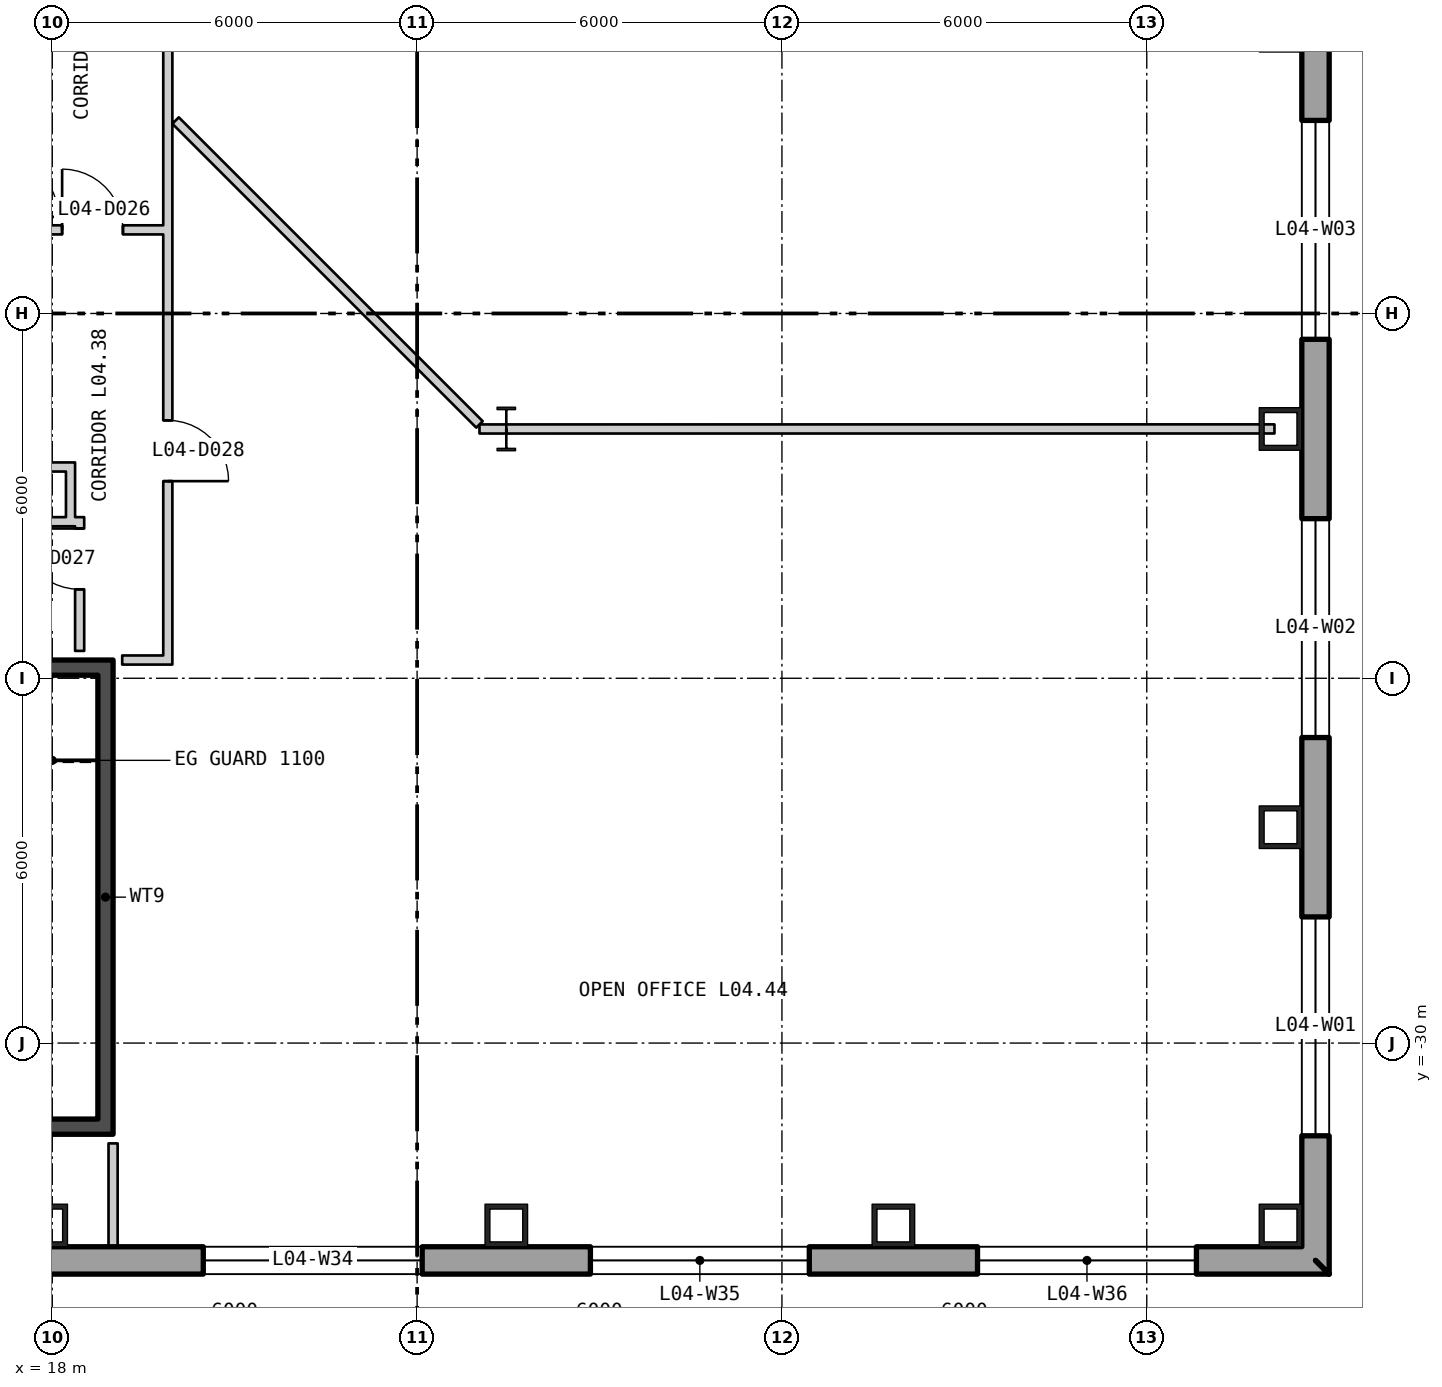
"""IFC4 building model, lengths in metres.
Left out: names, types, materials, properties, quantities, classifications, styles, units other than length and angle.
Written with IfcOpenShell. Run it as: python <this file> out.ifc"""

import sys

from ifc_helpers import new_model, si_unit, direction, frame, frame_2d, origin, origin_2d, place, context, subcontext, project, spatial, polyline, rectangle, hollow_rectangle, i_section, outline, extrude, element, fill, save


model = new_model("IFC4")
c1 = context("Model", 3, precision=1e-05, world=origin(), true_north=direction((0.0, 1.0)))
c2 = subcontext(c1, "Body", "Model", "MODEL_VIEW")
j1 = project(units=[si_unit("LENGTHUNIT", "METRE"), si_unit("PLANEANGLEUNIT", "RADIAN")], contexts=[c1])
p1 = place(None, origin())
s1 = spatial("IfcSite", under=j1, at=p1, CompositionType="ELEMENT")
p2 = place(p1, origin())
s2 = spatial("IfcBuilding", under=s1, at=p2, CompositionType="ELEMENT")
p3 = place(p2, frame((0.0, 0.0, 23.7)))
s3 = spatial("IfcBuildingStorey", under=s2, at=p3, CompositionType="ELEMENT", Elevation=23.7)
for number, where, z_axis, x_axis in (
    (1, (38.2, -33.0, 0.0), (0.0, 0.0, 1.0), (0.0, 1.0, 0.0)),
    (2, (38.2, -26.45, 0.0), (0.0, 0.0, 1.0), (0.0, 1.0, 0.0)),
    (3, (38.2, -19.9, 0.0), (0.0, 0.0, 1.0), (0.0, 1.0, 0.0)),
    (4, (17.9, -33.0, 0.0), (0.0, 0.0, 1.0), (1.0, 0.0, 0.0)),
    (5, (25.467, -33.0, 0.0), (0.0, 0.0, 1.0), (1.0, 0.0, 0.0)),
    (6, (31.833, -33.0, 0.0), (0.0, 0.0, 1.0), (1.0, 0.0, 0.0)),
):
    element("IfcColumn", number, at=place(p3, frame(where, z_axis=z_axis, x_axis=x_axis)), inside=s3, PredefinedType="COLUMN", context=c2, shape_type="SweptSolid", body=[
        extrude(hollow_rectangle(XDim=0.7, YDim=0.7, WallThickness=0.08, at=origin_2d()), origin(), (0.0, 0.0, 1.0), 4.85),
    ])
p4 = place(p3, frame((25.467, -19.9, 0.0), z_axis=(0.0, 0.0, 1.0), x_axis=(1.0, 0.0, 0.0)))
e7 = element("IfcColumn", 7, at=p4, inside=s3, PredefinedType="COLUMN", context=c2, shape_type="SweptSolid", body=[
    extrude(i_section(OverallWidth=0.304, OverallDepth=0.716, WebThickness=0.021, FlangeThickness=0.04, at=origin_2d()), origin(), (0.0, 0.0, 1.0), 4.85),
])
p5 = place(p3, frame((38.775, -33.575, -0.4), z_axis=(0.0, 0.0, 1.0), x_axis=(0.0, 1.0, 0.0)))
e8 = element("IfcWall", 8, at=p5, inside=s3, PredefinedType="SOLIDWALL", context=c2, shape_type="SweptSolid", body=[
    extrude(outline(polyline([(-0.225, -0.225), (53.775, -0.225), (53.325, 0.225), (0.225, 0.225), (-0.225, -0.225)])), origin(), (0.0, 0.0, 1.0), 5.1),
])
p6 = place(p5, frame((2.05, 0.0, 1.3)))
e9 = element("IfcOpeningElement", 9, at=p6, cuts=e8, PredefinedType="OPENING", context=c2, shape_type="SweptSolid", body=[
    extrude(rectangle(XDim=3.6, YDim=3.2, at=frame_2d((1.8, 1.6))), frame((0.0, 0.235, 0.0), z_axis=(0.0, -1.0, 0.0), x_axis=(1.0, 0.0, 0.0)), (0.0, 0.0, 1.0), 0.47),
])
p7 = place(p5, frame((8.6, 0.0, 1.3)))
e10 = element("IfcOpeningElement", 10, at=p7, cuts=e8, PredefinedType="OPENING", context=c2, shape_type="SweptSolid", body=[
    extrude(rectangle(XDim=3.6, YDim=3.2, at=frame_2d((1.8, 1.6))), frame((0.0, 0.235, 0.0), z_axis=(0.0, -1.0, 0.0), x_axis=(1.0, 0.0, 0.0)), (0.0, 0.0, 1.0), 0.47),
])
p8 = place(p5, frame((15.15, 0.0, 1.3)))
e11 = element("IfcOpeningElement", 11, at=p8, cuts=e8, PredefinedType="OPENING", context=c2, shape_type="SweptSolid", body=[
    extrude(rectangle(XDim=3.6, YDim=3.2, at=frame_2d((1.8, 1.6))), frame((0.0, 0.235, 0.0), z_axis=(0.0, -1.0, 0.0), x_axis=(1.0, 0.0, 0.0)), (0.0, 0.0, 1.0), 0.47),
])
p9 = place(p5, frame((21.7, 0.0, 1.3)))
e12 = element("IfcOpeningElement", 12, at=p9, cuts=e8, PredefinedType="OPENING", context=c2, shape_type="SweptSolid", body=[
    extrude(rectangle(XDim=3.6, YDim=3.2, at=frame_2d((1.8, 1.6))), frame((0.0, 0.235, 0.0), z_axis=(0.0, -1.0, 0.0), x_axis=(1.0, 0.0, 0.0)), (0.0, 0.0, 1.0), 0.47),
])
p10 = place(p5, frame((28.25, 0.0, 1.3)))
e13 = element("IfcOpeningElement", 13, at=p10, cuts=e8, PredefinedType="OPENING", context=c2, shape_type="SweptSolid", body=[
    extrude(rectangle(XDim=3.6, YDim=3.2, at=frame_2d((1.8, 1.6))), frame((0.0, 0.235, 0.0), z_axis=(0.0, -1.0, 0.0), x_axis=(1.0, 0.0, 0.0)), (0.0, 0.0, 1.0), 0.47),
])
p11 = place(p5, frame((34.8, 0.0, 1.3)))
e14 = element("IfcOpeningElement", 14, at=p11, cuts=e8, PredefinedType="OPENING", context=c2, shape_type="SweptSolid", body=[
    extrude(rectangle(XDim=3.6, YDim=3.2, at=frame_2d((1.8, 1.6))), frame((0.0, 0.235, 0.0), z_axis=(0.0, -1.0, 0.0), x_axis=(1.0, 0.0, 0.0)), (0.0, 0.0, 1.0), 0.47),
])
p12 = place(p5, frame((41.35, 0.0, 1.3)))
e15 = element("IfcOpeningElement", 15, at=p12, cuts=e8, PredefinedType="OPENING", context=c2, shape_type="SweptSolid", body=[
    extrude(rectangle(XDim=3.6, YDim=3.2, at=frame_2d((1.8, 1.6))), frame((0.0, 0.235, 0.0), z_axis=(0.0, -1.0, 0.0), x_axis=(1.0, 0.0, 0.0)), (0.0, 0.0, 1.0), 0.47),
])
p13 = place(p5, frame((47.9, 0.0, 1.3)))
e16 = element("IfcOpeningElement", 16, at=p13, cuts=e8, PredefinedType="OPENING", context=c2, shape_type="SweptSolid", body=[
    extrude(rectangle(XDim=3.6, YDim=3.2, at=frame_2d((1.8, 1.6))), frame((0.0, 0.235, 0.0), z_axis=(0.0, -1.0, 0.0), x_axis=(1.0, 0.0, 0.0)), (0.0, 0.0, 1.0), 0.47),
])
p14 = place(p3, frame((-38.775, -33.575, -0.4), z_axis=(0.0, 0.0, 1.0), x_axis=(1.0, 0.0, 0.0)))
e17 = element("IfcWall", 17, at=p14, inside=s3, PredefinedType="SOLIDWALL", context=c2, shape_type="SweptSolid", body=[
    extrude(outline(polyline([(-0.225, -0.225), (77.775, -0.225), (77.325, 0.225), (0.225, 0.225), (-0.225, -0.225)])), origin(), (0.0, 0.0, 1.0), 5.1),
])
p15 = place(p14, frame((1.958, 0.0, 1.3)))
e18 = element("IfcOpeningElement", 18, at=p15, cuts=e17, PredefinedType="OPENING", context=c2, shape_type="SweptSolid", body=[
    extrude(rectangle(XDim=3.6, YDim=3.2, at=frame_2d((1.8, 1.6))), frame((0.0, 0.235, 0.0), z_axis=(0.0, -1.0, 0.0), x_axis=(1.0, 0.0, 0.0)), (0.0, 0.0, 1.0), 0.47),
])
p16 = place(p14, frame((8.325, 0.0, 1.3)))
e19 = element("IfcOpeningElement", 19, at=p16, cuts=e17, PredefinedType="OPENING", context=c2, shape_type="SweptSolid", body=[
    extrude(rectangle(XDim=3.6, YDim=3.2, at=frame_2d((1.8, 1.6))), frame((0.0, 0.235, 0.0), z_axis=(0.0, -1.0, 0.0), x_axis=(1.0, 0.0, 0.0)), (0.0, 0.0, 1.0), 0.47),
])
p17 = place(p14, frame((14.692, 0.0, 1.3)))
e20 = element("IfcOpeningElement", 20, at=p17, cuts=e17, PredefinedType="OPENING", context=c2, shape_type="SweptSolid", body=[
    extrude(rectangle(XDim=3.6, YDim=3.2, at=frame_2d((1.8, 1.6))), frame((0.0, 0.235, 0.0), z_axis=(0.0, -1.0, 0.0), x_axis=(1.0, 0.0, 0.0)), (0.0, 0.0, 1.0), 0.47),
])
p18 = place(p14, frame((21.325, 0.0, 1.3)))
e21 = element("IfcOpeningElement", 21, at=p18, cuts=e17, PredefinedType="OPENING", context=c2, shape_type="SweptSolid", body=[
    extrude(rectangle(XDim=3.6, YDim=3.2, at=frame_2d((1.8, 1.6))), frame((0.0, 0.235, 0.0), z_axis=(0.0, -1.0, 0.0), x_axis=(1.0, 0.0, 0.0)), (0.0, 0.0, 1.0), 0.47),
])
p19 = place(p14, frame((27.425, 0.0, 1.3)))
e22 = element("IfcOpeningElement", 22, at=p19, cuts=e17, PredefinedType="OPENING", context=c2, shape_type="SweptSolid", body=[
    extrude(rectangle(XDim=3.6, YDim=3.2, at=frame_2d((1.8, 1.6))), frame((0.0, 0.235, 0.0), z_axis=(0.0, -1.0, 0.0), x_axis=(1.0, 0.0, 0.0)), (0.0, 0.0, 1.0), 0.47),
])
p20 = place(p14, frame((33.792, 0.0, 1.3)))
e23 = element("IfcOpeningElement", 23, at=p20, cuts=e17, PredefinedType="OPENING", context=c2, shape_type="SweptSolid", body=[
    extrude(rectangle(XDim=3.6, YDim=3.2, at=frame_2d((1.8, 1.6))), frame((0.0, 0.235, 0.0), z_axis=(0.0, -1.0, 0.0), x_axis=(1.0, 0.0, 0.0)), (0.0, 0.0, 1.0), 0.47),
])
p21 = place(p14, frame((40.158, 0.0, 1.3)))
e24 = element("IfcOpeningElement", 24, at=p21, cuts=e17, PredefinedType="OPENING", context=c2, shape_type="SweptSolid", body=[
    extrude(rectangle(XDim=3.6, YDim=3.2, at=frame_2d((1.8, 1.6))), frame((0.0, 0.235, 0.0), z_axis=(0.0, -1.0, 0.0), x_axis=(1.0, 0.0, 0.0)), (0.0, 0.0, 1.0), 0.47),
])
p22 = place(p14, frame((46.525, 0.0, 1.3)))
e25 = element("IfcOpeningElement", 25, at=p22, cuts=e17, PredefinedType="OPENING", context=c2, shape_type="SweptSolid", body=[
    extrude(rectangle(XDim=3.6, YDim=3.2, at=frame_2d((1.8, 1.6))), frame((0.0, 0.235, 0.0), z_axis=(0.0, -1.0, 0.0), x_axis=(1.0, 0.0, 0.0)), (0.0, 0.0, 1.0), 0.47),
])
p23 = place(p14, frame((52.625, 0.0, 1.3)))
e26 = element("IfcOpeningElement", 26, at=p23, cuts=e17, PredefinedType="OPENING", context=c2, shape_type="SweptSolid", body=[
    extrude(rectangle(XDim=3.6, YDim=3.2, at=frame_2d((1.8, 1.6))), frame((0.0, 0.235, 0.0), z_axis=(0.0, -1.0, 0.0), x_axis=(1.0, 0.0, 0.0)), (0.0, 0.0, 1.0), 0.47),
])
p24 = place(p14, frame((59.258, 0.0, 1.3)))
e27 = element("IfcOpeningElement", 27, at=p24, cuts=e17, PredefinedType="OPENING", context=c2, shape_type="SweptSolid", body=[
    extrude(rectangle(XDim=3.6, YDim=3.2, at=frame_2d((1.8, 1.6))), frame((0.0, 0.235, 0.0), z_axis=(0.0, -1.0, 0.0), x_axis=(1.0, 0.0, 0.0)), (0.0, 0.0, 1.0), 0.47),
])
p25 = place(p14, frame((65.625, 0.0, 1.3)))
e28 = element("IfcOpeningElement", 28, at=p25, cuts=e17, PredefinedType="OPENING", context=c2, shape_type="SweptSolid", body=[
    extrude(rectangle(XDim=3.6, YDim=3.2, at=frame_2d((1.8, 1.6))), frame((0.0, 0.235, 0.0), z_axis=(0.0, -1.0, 0.0), x_axis=(1.0, 0.0, 0.0)), (0.0, 0.0, 1.0), 0.47),
])
p26 = place(p14, frame((71.992, 0.0, 1.3)))
e29 = element("IfcOpeningElement", 29, at=p26, cuts=e17, PredefinedType="OPENING", context=c2, shape_type="SweptSolid", body=[
    extrude(rectangle(XDim=3.6, YDim=3.2, at=frame_2d((1.8, 1.6))), frame((0.0, 0.235, 0.0), z_axis=(0.0, -1.0, 0.0), x_axis=(1.0, 0.0, 0.0)), (0.0, 0.0, 1.0), 0.47),
])
p27 = place(p3, frame((18.875, -31.25, 0.0), z_axis=(0.0, 0.0, 1.0), x_axis=(0.0, 1.0, 0.0)))
e30 = element("IfcWall", 30, at=p27, inside=s3, PredefinedType="SHEAR", context=c2, shape_type="SweptSolid", body=[
    extrude(rectangle(XDim=7.3, YDim=0.25, at=frame_2d((3.65, 0.0))), origin(), (0.0, 0.0, 1.0), 4.85),
])
p28 = place(p3, frame((15.5, -31.375, 0.0), z_axis=(0.0, 0.0, 1.0), x_axis=(1.0, 0.0, 0.0)))
e31 = element("IfcWall", 31, at=p28, inside=s3, PredefinedType="SHEAR", context=c2, shape_type="SweptSolid", body=[
    extrude(rectangle(XDim=3.5, YDim=0.25, at=frame_2d((1.75, 0.0))), origin(), (0.0, 0.0, 1.0), 4.85),
])
p29 = place(p3, frame((15.5, -23.825, 0.0), z_axis=(0.0, 0.0, 1.0), x_axis=(1.0, 0.0, 0.0)))
e32 = element("IfcWall", 32, at=p29, inside=s3, PredefinedType="SHEAR", context=c2, shape_type="SweptSolid", body=[
    extrude(rectangle(XDim=3.5, YDim=0.25, at=frame_2d((1.75, 0.0))), origin(), (0.0, 0.0, 1.0), 4.85),
])
p30 = place(p29, frame((1.15, 0.0, 0.0)))
e33 = element("IfcOpeningElement", 33, at=p30, cuts=e32, PredefinedType="OPENING", context=c2, shape_type="SweptSolid", body=[
    extrude(rectangle(XDim=1.2, YDim=2.1, at=frame_2d((0.6, 1.05))), frame((0.0, 0.135, 0.0), z_axis=(0.0, -1.0, 0.0), x_axis=(1.0, 0.0, 0.0)), (0.0, 0.0, 1.0), 0.27),
])
p31 = place(p3, frame((17.5, -16.625, 0.0), z_axis=(0.0, 0.0, 1.0), x_axis=(1.0, 0.0, 0.0)))
e34 = element("IfcWall", 34, at=p31, inside=s3, PredefinedType="PARTITIONING", context=c2, shape_type="SweptSolid", body=[
    extrude(rectangle(XDim=2.325, YDim=0.15, at=frame_2d((1.163, 0.0))), origin(), (0.0, 0.0, 1.0), 4.85),
])
p32 = place(p31, frame((0.662, 0.0, 0.0)))
e35 = element("IfcOpeningElement", 35, at=p32, cuts=e34, PredefinedType="OPENING", context=c2, shape_type="SweptSolid", body=[
    extrude(rectangle(XDim=1.0, YDim=2.1, at=frame_2d((0.5, 1.05))), frame((0.0, 0.085, 0.0), z_axis=(0.0, -1.0, 0.0), x_axis=(1.0, 0.0, 0.0)), (0.0, 0.0, 1.0), 0.17),
])
for number, where, z_axis, x_axis in (
    (36, (17.575, -21.425, 0.0), (0.0, 0.0, 1.0), (1.0, 0.0, 0.0)),
    (37, (17.575, -20.525, 0.0), (0.0, 0.0, 1.0), (1.0, 0.0, 0.0)),
):
    element("IfcWall", number, at=place(p3, frame(where, z_axis=z_axis, x_axis=x_axis)), inside=s3, PredefinedType="PARTITIONING", context=c2, shape_type="SweptSolid", body=[
        extrude(rectangle(XDim=0.65, YDim=0.15, at=frame_2d((0.325, 0.0))), origin(), (0.0, 0.0, 1.0), 4.85),
    ])
p33 = place(p3, frame((18.3, -21.5, 0.0), z_axis=(0.0, 0.0, 1.0), x_axis=(0.0, 1.0, 0.0)))
e38 = element("IfcWall", 38, at=p33, inside=s3, PredefinedType="PARTITIONING", context=c2, shape_type="SweptSolid", body=[
    extrude(rectangle(XDim=1.05, YDim=0.15, at=frame_2d((0.525, 0.0))), origin(), (0.0, 0.0, 1.0), 4.85),
])
p34 = place(p3, frame((18.45, -23.55, 0.0), z_axis=(0.0, 0.0, 1.0), x_axis=(0.0, 1.0, 0.0)))
e39 = element("IfcWall", 39, at=p34, inside=s3, PredefinedType="PARTITIONING", context=c2, shape_type="SweptSolid", body=[
    extrude(rectangle(XDim=2.2, YDim=0.15, at=frame_2d((1.1, 0.0))), origin(), (0.0, 0.0, 1.0), 4.85),
])
p35 = place(p34, frame((1.013, 0.0, 0.0)))
e40 = element("IfcOpeningElement", 40, at=p35, cuts=e39, PredefinedType="OPENING", context=c2, shape_type="SweptSolid", body=[
    extrude(rectangle(XDim=1.0, YDim=2.1, at=frame_2d((0.5, 1.05))), frame((0.0, 0.085, 0.0), z_axis=(0.0, -1.0, 0.0), x_axis=(1.0, 0.0, 0.0)), (0.0, 0.0, 1.0), 0.17),
])
p36 = place(p3, frame((19.0, -33.348, 0.0), z_axis=(0.0, 0.0, 1.0), x_axis=(0.0, 1.0, 0.0)))
e41 = element("IfcWall", 41, at=p36, inside=s3, PredefinedType="PARTITIONING", context=c2, shape_type="SweptSolid", body=[
    extrude(rectangle(XDim=0.448, YDim=0.15, at=frame_2d((0.224, 0.0))), origin(), (0.0, 0.0, 1.0), 4.85),
])
p37 = place(p3, frame((19.0, -32.9, 0.0), z_axis=(0.0, 0.0, 1.0), x_axis=(0.0, 1.0, 0.0)))
e42 = element("IfcWall", 42, at=p37, inside=s3, PredefinedType="PARTITIONING", context=c2, shape_type="SweptSolid", body=[
    extrude(rectangle(XDim=1.25, YDim=0.15, at=frame_2d((0.625, 0.0))), origin(), (0.0, 0.0, 1.0), 4.16),
])
p38 = place(p3, frame((19.15, -23.7, 0.0), z_axis=(0.0, 0.0, 1.0), x_axis=(1.0, 0.0, 0.0)))
e43 = element("IfcWall", 43, at=p38, inside=s3, PredefinedType="PARTITIONING", context=c2, shape_type="SweptSolid", body=[
    extrude(rectangle(XDim=0.675, YDim=0.15, at=frame_2d((0.338, 0.0))), origin(), (0.0, 0.0, 1.0), 4.85),
])
p39 = place(p3, frame((19.9, -23.775, 0.0), z_axis=(0.0, 0.0, 1.0), x_axis=(0.0, 1.0, 0.0)))
e44 = element("IfcWall", 44, at=p39, inside=s3, PredefinedType="PARTITIONING", context=c2, shape_type="SweptSolid", body=[
    extrude(rectangle(XDim=21.187, YDim=0.15, at=frame_2d((10.594, 0.0))), origin(), (0.0, 0.0, 1.0), 4.85),
])
p40 = place(p39, frame((3.017, 0.0, 0.0)))
e45 = element("IfcOpeningElement", 45, at=p40, cuts=e44, PredefinedType="OPENING", context=c2, shape_type="SweptSolid", body=[
    extrude(rectangle(XDim=1.0, YDim=2.1, at=frame_2d((0.5, 1.05))), frame((0.0, 0.085, 0.0), z_axis=(0.0, -1.0, 0.0), x_axis=(1.0, 0.0, 0.0)), (0.0, 0.0, 1.0), 0.17),
])
p41 = place(p39, frame((12.423, 0.0, 0.0)))
e46 = element("IfcOpeningElement", 46, at=p41, cuts=e44, PredefinedType="OPENING", context=c2, shape_type="SweptSolid", body=[
    extrude(rectangle(XDim=1.0, YDim=2.1, at=frame_2d((0.5, 1.05))), frame((0.0, 0.085, 0.0), z_axis=(0.0, -1.0, 0.0), x_axis=(1.0, 0.0, 0.0)), (0.0, 0.0, 1.0), 0.17),
])
p42 = place(p3, frame((20.028, -14.827, 0.0), z_axis=(0.0, 0.0, 1.0), x_axis=(0.707106781187, -0.707106781187, 0.0)))
e47 = element("IfcWall", 47, at=p42, inside=s3, PredefinedType="PARTITIONING", context=c2, shape_type="SweptSolid", body=[
    extrude(rectangle(XDim=7.068, YDim=0.15, at=frame_2d((3.534, 0.0))), origin(), (0.0, 0.0, 1.0), 4.85),
])
p43 = place(p3, frame((25.026, -19.9, 0.0), z_axis=(0.0, 0.0, 1.0), x_axis=(1.0, 0.0, 0.0)))
e48 = element("IfcWall", 48, at=p43, inside=s3, PredefinedType="PARTITIONING", context=c2, shape_type="SweptSolid", body=[
    extrude(rectangle(XDim=0.441, YDim=0.15, at=frame_2d((0.221, 0.0))), origin(), (0.0, 0.0, 1.0), 4.85),
])
p44 = place(p3, frame((25.467, -19.9, 0.0), z_axis=(0.0, 0.0, 1.0), x_axis=(0.999999996867, 7.9157761e-05, 0.0)))
e49 = element("IfcWall", 49, at=p44, inside=s3, PredefinedType="PARTITIONING", context=c2, shape_type="SweptSolid", body=[
    extrude(rectangle(XDim=12.633, YDim=0.15, at=frame_2d((6.316, 0.0))), origin(), (0.0, 0.0, 1.0), 4.06),
])
p45 = place(p6, origin())
e50 = element("IfcWindow", 50, at=p45, inside=s3, PartitioningType="SINGLE_PANEL", PredefinedType="WINDOW", context=c2, shape_type="SweptSolid", body=[
    extrude(rectangle(XDim=3.6, YDim=3.2, at=frame_2d((1.8, 1.6))), frame((0.0, 0.105, 0.0), z_axis=(0.0, -1.0, 0.0), x_axis=(1.0, 0.0, 0.0)), (0.0, 0.0, 1.0), 0.06),
])
fill(e9, e50)
p46 = place(p7, origin())
e51 = element("IfcWindow", 51, at=p46, inside=s3, PartitioningType="SINGLE_PANEL", PredefinedType="WINDOW", context=c2, shape_type="SweptSolid", body=[
    extrude(rectangle(XDim=3.6, YDim=3.2, at=frame_2d((1.8, 1.6))), frame((0.0, 0.105, 0.0), z_axis=(0.0, -1.0, 0.0), x_axis=(1.0, 0.0, 0.0)), (0.0, 0.0, 1.0), 0.06),
])
fill(e10, e51)
p47 = place(p8, origin())
e52 = element("IfcWindow", 52, at=p47, inside=s3, PartitioningType="SINGLE_PANEL", PredefinedType="WINDOW", context=c2, shape_type="SweptSolid", body=[
    extrude(rectangle(XDim=3.6, YDim=3.2, at=frame_2d((1.8, 1.6))), frame((0.0, 0.105, 0.0), z_axis=(0.0, -1.0, 0.0), x_axis=(1.0, 0.0, 0.0)), (0.0, 0.0, 1.0), 0.06),
])
fill(e11, e52)
p48 = place(p24, origin())
e53 = element("IfcWindow", 53, at=p48, inside=s3, PartitioningType="SINGLE_PANEL", PredefinedType="WINDOW", context=c2, shape_type="SweptSolid", body=[
    extrude(rectangle(XDim=3.6, YDim=3.2, at=frame_2d((1.8, 1.6))), frame((0.0, 0.105, 0.0), z_axis=(0.0, -1.0, 0.0), x_axis=(1.0, 0.0, 0.0)), (0.0, 0.0, 1.0), 0.06),
])
fill(e27, e53)
p49 = place(p25, origin())
e54 = element("IfcWindow", 54, at=p49, inside=s3, PartitioningType="SINGLE_PANEL", PredefinedType="WINDOW", context=c2, shape_type="SweptSolid", body=[
    extrude(rectangle(XDim=3.6, YDim=3.2, at=frame_2d((1.8, 1.6))), frame((0.0, 0.105, 0.0), z_axis=(0.0, -1.0, 0.0), x_axis=(1.0, 0.0, 0.0)), (0.0, 0.0, 1.0), 0.06),
])
fill(e28, e54)
p50 = place(p26, origin())
e55 = element("IfcWindow", 55, at=p50, inside=s3, PartitioningType="SINGLE_PANEL", PredefinedType="WINDOW", context=c2, shape_type="SweptSolid", body=[
    extrude(rectangle(XDim=3.6, YDim=3.2, at=frame_2d((1.8, 1.6))), frame((0.0, 0.105, 0.0), z_axis=(0.0, -1.0, 0.0), x_axis=(1.0, 0.0, 0.0)), (0.0, 0.0, 1.0), 0.06),
])
fill(e29, e55)
p51 = place(p32, origin())
e56 = element("IfcDoor", 56, at=p51, inside=s3, OperationType="SINGLE_SWING_RIGHT", PredefinedType="DOOR", context=c2, shape_type="SweptSolid", body=[
    extrude(rectangle(XDim=1.0, YDim=2.1, at=frame_2d((0.5, 1.05))), frame((0.0, 0.025, 0.0), z_axis=(0.0, -1.0, 0.0), x_axis=(1.0, 0.0, 0.0)), (0.0, 0.0, 1.0), 0.05),
])
fill(e35, e56)
p52 = place(p35, origin())
e57 = element("IfcDoor", 57, at=p52, inside=s3, OperationType="SINGLE_SWING_LEFT", PredefinedType="DOOR", context=c2, shape_type="SweptSolid", body=[
    extrude(rectangle(XDim=1.0, YDim=2.1, at=frame_2d((0.5, 1.05))), frame((0.0, 0.025, 0.0), z_axis=(0.0, -1.0, 0.0), x_axis=(1.0, 0.0, 0.0)), (0.0, 0.0, 1.0), 0.05),
])
fill(e40, e57)
p53 = place(p40, origin())
e58 = element("IfcDoor", 58, at=p53, inside=s3, OperationType="SINGLE_SWING_LEFT", PredefinedType="DOOR", context=c2, shape_type="SweptSolid", body=[
    extrude(rectangle(XDim=1.0, YDim=2.1, at=frame_2d((0.5, 1.05))), frame((0.0, 0.025, 0.0), z_axis=(0.0, -1.0, 0.0), x_axis=(1.0, 0.0, 0.0)), (0.0, 0.0, 1.0), 0.05),
])
fill(e45, e58)
save(model, sys.argv[1])
